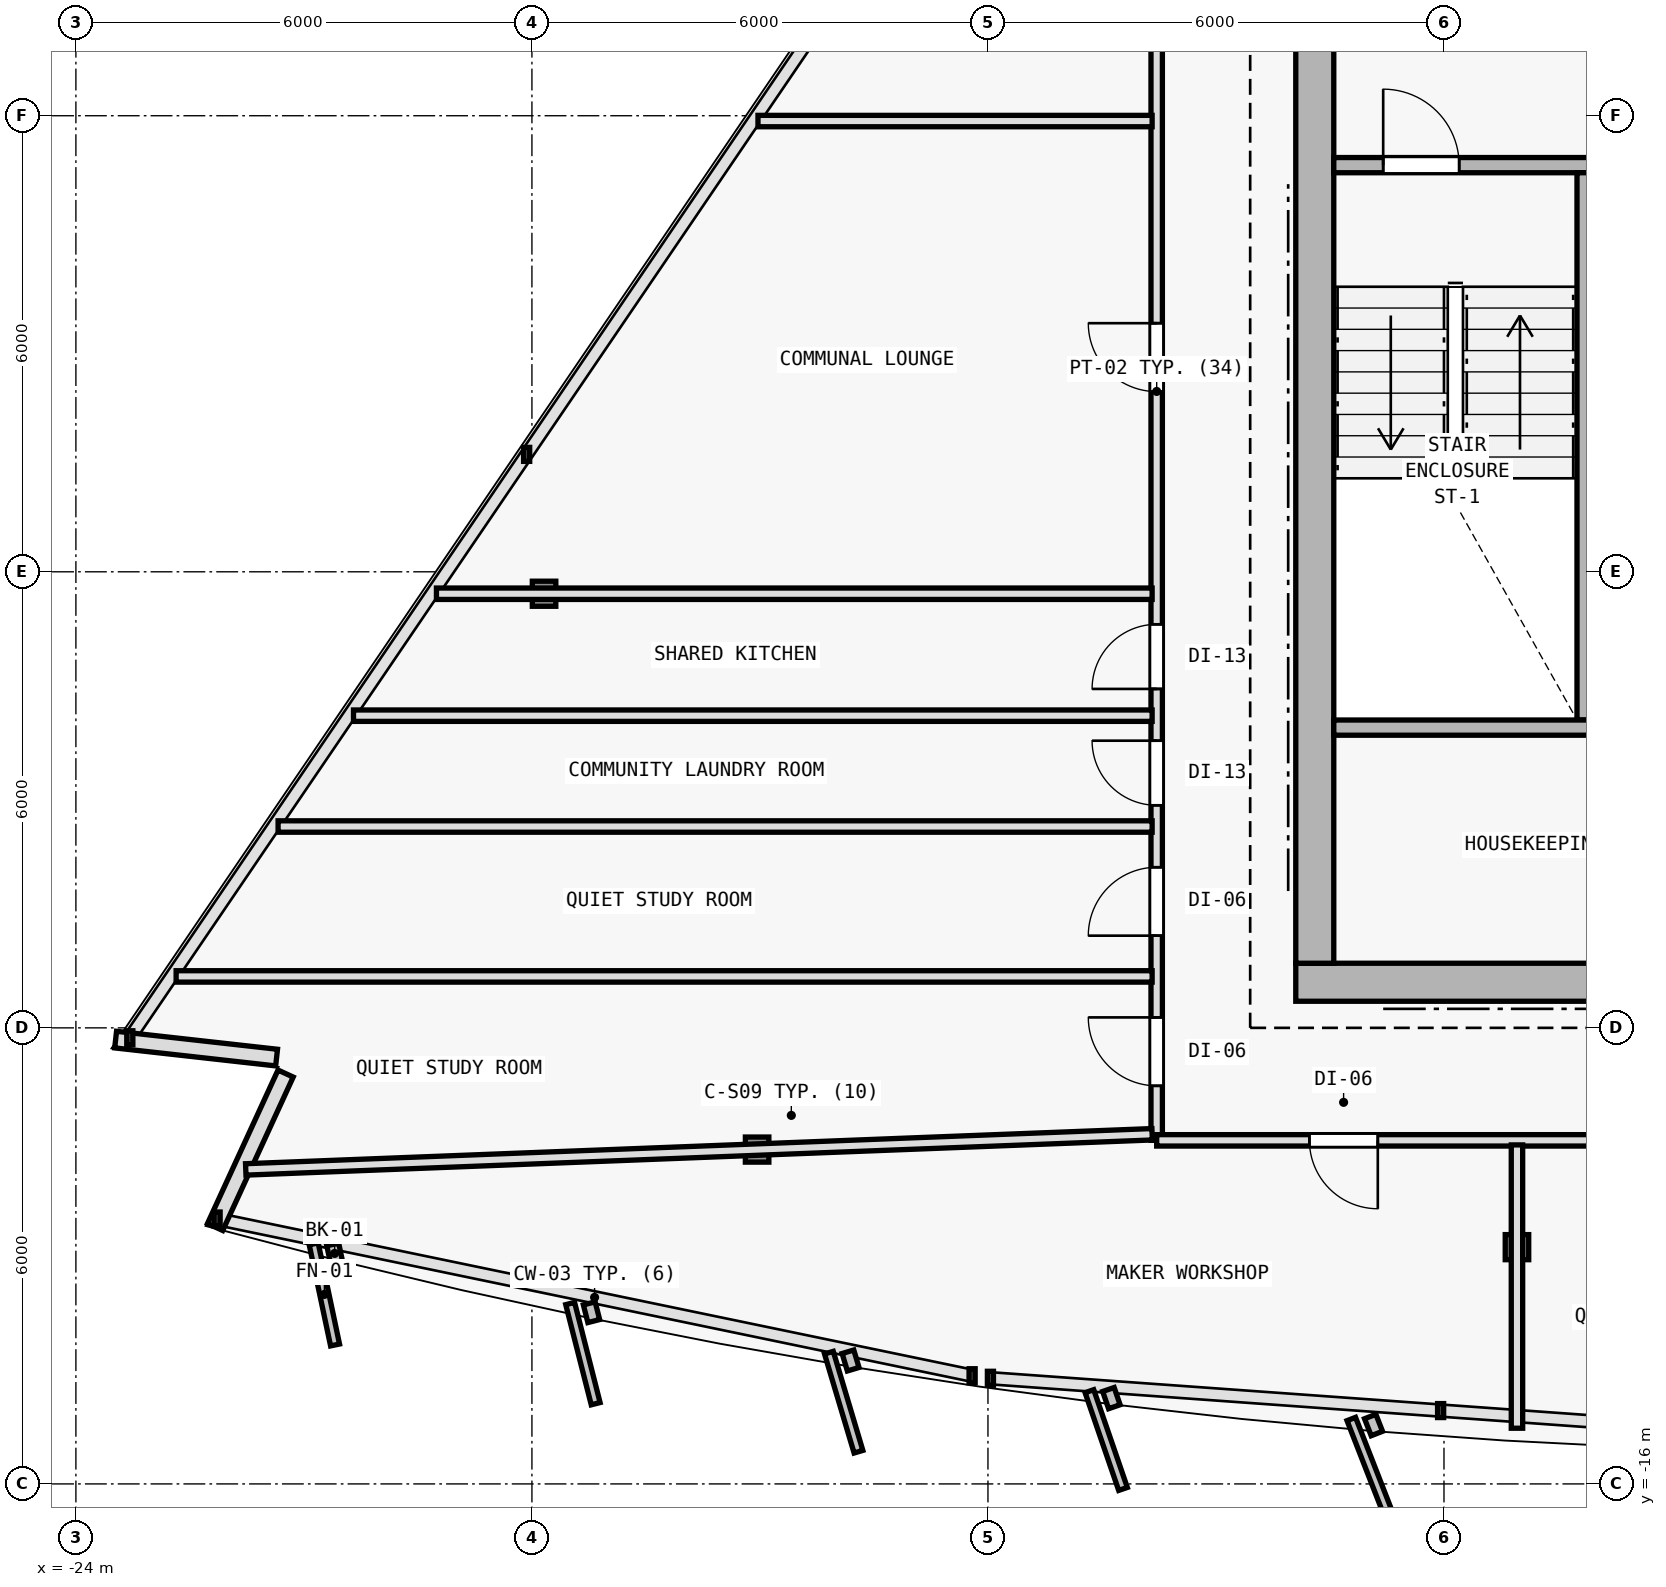
"""IFC4 building model, lengths in metres.
Left out: names, types, materials, properties, quantities, classifications, styles, units other than length and angle.
Written with IfcOpenShell. Run it as: python <this file> out.ifc"""

import sys

from ifc_helpers import new_model, si_unit, direction, frame, frame_2d, origin, origin_2d, place, context, subcontext, project, spatial, rectangle, i_section, extrude, element, fill, save


model = new_model("IFC4")
c1 = context("Model", 3, precision=1e-05, world=origin(), true_north=direction((0.0, 1.0)))
c2 = subcontext(c1, "Body", "Model", "MODEL_VIEW")
j1 = project(units=[si_unit("LENGTHUNIT", "METRE"), si_unit("PLANEANGLEUNIT", "RADIAN")], contexts=[c1])
p1 = place(None, origin())
s1 = spatial("IfcSite", under=j1, at=p1, CompositionType="ELEMENT")
p2 = place(p1, origin())
s2 = spatial("IfcBuilding", under=s1, at=p2, CompositionType="ELEMENT")
p3 = place(p2, frame((0.0, 0.0, 294.0)))
s3 = spatial("IfcBuildingStorey", under=s2, at=p3, CompositionType="ELEMENT", Elevation=294.0)
for number, where, z_axis, x_axis in (
    (1, (-7.7, -9.4, 0.0), (0.0, 0.0, 1.0), (1.0, 0.0, 0.0)),
    (2, (-7.7, 2.0, 0.0), (0.0, 0.0, 1.0), (1.0, 0.0, 0.0)),
):
    element("IfcColumn", number, at=place(p3, frame(where, z_axis=z_axis, x_axis=x_axis)), inside=s3, PredefinedType="COLUMN", context=c2, shape_type="SweptSolid", body=[
        extrude(i_section(OverallWidth=0.374, OverallDepth=0.372, WebThickness=0.012, FlangeThickness=0.02, FilletRadius=0.015, at=origin_2d()), origin(), (0.0, 0.0, 1.0), 3.6),
    ])
for number, where, z_axis, x_axis in (
    (3, (-15.037, -11.602, 0.006), (0.0, 0.0, 1.0), (1.0, 0.0, 0.0)),
    (4, (-5.04, -12.885, 0.006), (0.0, 0.0, 1.0), (1.0, 0.0, 0.0)),
    (5, (-17.84, -4.289, 0.006), (0.0, 0.0, 1.0), (1.0, 0.0, 0.0)),
):
    element("IfcColumn", number, at=place(p3, frame(where, z_axis=z_axis, x_axis=x_axis)), inside=s3, PredefinedType="COLUMN", context=c2, shape_type="SweptSolid", body=[
        extrude(i_section(OverallWidth=0.309, OverallDepth=0.33, WebThickness=0.011, FlangeThickness=0.019, FilletRadius=0.027, at=origin_2d()), origin(), (0.0, 0.0, 1.0), 3.594),
    ])
p4 = place(p3, frame((-21.36, -10.391, 0.0), z_axis=(0.0, 0.0, 1.0), x_axis=(-0.993817888275, 0.111022542511, 0.0)))
e6 = element("IfcWall", 6, at=p4, inside=s3, PredefinedType="SOLIDWALL", context=c2, shape_type="SweptSolid", body=[
    extrude(rectangle(XDim=2.131, YDim=0.22, at=frame_2d((1.065, 0.0))), origin(), (0.0, 0.0, 1.0), 3.34),
])
p5 = place(p3, frame((-22.168, -12.62, 0.0), z_axis=(0.0, 0.0, 1.0), x_axis=(0.417426589535, 0.908710648308, 0.0)))
e7 = element("IfcWall", 7, at=p5, inside=s3, PredefinedType="SOLIDWALL", context=c2, shape_type="SweptSolid", body=[
    extrude(rectangle(XDim=2.221, YDim=0.22, at=frame_2d((1.111, 0.0))), origin(), (0.0, 0.0, 1.0), 3.34),
])
p6 = place(p3, frame((-7.95, -9.4, 0.0), z_axis=(0.0, 0.0, 1.0), x_axis=(1.0, 0.0, 0.0)))
e8 = element("IfcWall", 8, at=p6, inside=s3, PredefinedType="SHEAR", context=c2, shape_type="SweptSolid", body=[
    extrude(rectangle(XDim=15.9, YDim=0.5, at=frame_2d((7.95, 0.0))), origin(), (0.0, 0.0, 1.0), 3.34),
])
p7 = place(p6, frame((9.6, 0.0, 0.0)))
e9 = element("IfcOpeningElement", 9, at=p7, cuts=e8, PredefinedType="OPENING", context=c2, shape_type="SweptSolid", body=[
    extrude(rectangle(XDim=1.5, YDim=2.2, at=frame_2d((0.75, 1.1))), frame((0.0, 0.26, 0.0), z_axis=(0.0, -1.0, 0.0), x_axis=(1.0, 0.0, 0.0)), (0.0, 0.0, 1.0), 0.52),
])
p8 = place(p3, frame((-7.7, -9.15, 0.0), z_axis=(0.0, 0.0, 1.0), x_axis=(0.0, 1.0, 0.0)))
e10 = element("IfcWall", 10, at=p8, inside=s3, PredefinedType="SHEAR", context=c2, shape_type="SweptSolid", body=[
    extrude(rectangle(XDim=19.1, YDim=0.5, at=frame_2d((9.55, 0.0))), origin(), (0.0, 0.0, 1.0), 3.34),
])
p9 = place(p8, frame((12.7, 0.0, 0.0)))
e11 = element("IfcOpeningElement", 11, at=p9, cuts=e10, PredefinedType="OPENING", context=c2, shape_type="SweptSolid", body=[
    extrude(rectangle(XDim=1.1, YDim=2.15, at=frame_2d((0.55, 1.075))), frame((0.0, 0.26, 0.0), z_axis=(0.0, -1.0, 0.0), x_axis=(1.0, 0.0, 0.0)), (0.0, 0.0, 1.0), 0.52),
])
p10 = place(p3, frame((-7.45, 1.35, 0.0), z_axis=(0.0, 0.0, 1.0), x_axis=(1.0, 0.0, 0.0)))
e12 = element("IfcWall", 12, at=p10, inside=s3, PredefinedType="SOLIDWALL", context=c2, shape_type="SweptSolid", body=[
    extrude(rectangle(XDim=3.4, YDim=0.2, at=frame_2d((1.7, 0.0))), origin(), (0.0, 0.0, 1.0), 3.34),
])
p11 = place(p10, frame((0.65, 0.0, 0.0)))
e13 = element("IfcOpeningElement", 13, at=p11, cuts=e12, PredefinedType="OPENING", context=c2, shape_type="SweptSolid", body=[
    extrude(rectangle(XDim=1.0, YDim=2.15, at=frame_2d((0.5, 1.075))), frame((0.0, 0.11, 0.0), z_axis=(0.0, -1.0, 0.0), x_axis=(1.0, 0.0, 0.0)), (0.0, 0.0, 1.0), 0.22),
])
p12 = place(p3, frame((-4.15, -5.95, 0.0), z_axis=(0.0, 0.0, 1.0), x_axis=(0.0, 1.0, 0.0)))
e14 = element("IfcWall", 14, at=p12, inside=s3, PredefinedType="SOLIDWALL", context=c2, shape_type="SweptSolid", body=[
    extrude(rectangle(XDim=7.2, YDim=0.2, at=frame_2d((3.6, 0.0))), origin(), (0.0, 0.0, 1.0), 3.34),
])
p13 = place(p3, frame((-7.45, -6.05, 0.0), z_axis=(0.0, 0.0, 1.0), x_axis=(1.0, 0.0, 0.0)))
e15 = element("IfcWall", 15, at=p13, inside=s3, PredefinedType="SOLIDWALL", context=c2, shape_type="SweptSolid", body=[
    extrude(rectangle(XDim=3.4, YDim=0.2, at=frame_2d((1.7, 0.0))), origin(), (0.0, 0.0, 1.0), 3.34),
])
p14 = place(p3, frame((-9.78, -11.48, 0.0), z_axis=(0.0, 0.0, 1.0), x_axis=(0.0, 1.0, 0.0)))
e16 = element("IfcWall", 16, at=p14, inside=s3, PredefinedType="PARTITIONING", context=c2, shape_type="SweptSolid", body=[
    extrude(rectangle(XDim=19.706, YDim=0.15, at=frame_2d((9.853, 0.0))), origin(), (0.0, 0.0, 1.0), 2.915),
])
p15 = place(p14, frame((9.851, 0.0, 0.0)))
e17 = element("IfcOpeningElement", 17, at=p15, cuts=e16, PredefinedType="OPENING", context=c2, shape_type="SweptSolid", body=[
    extrude(rectangle(XDim=0.9, YDim=2.1, at=frame_2d((0.45, 1.05))), frame((0.0, 0.085, 0.0), z_axis=(0.0, -1.0, 0.0), x_axis=(1.0, 0.0, 0.0)), (0.0, 0.0, 1.0), 0.17),
])
p16 = place(p14, frame((5.939, 0.0, 0.0)))
e18 = element("IfcOpeningElement", 18, at=p16, cuts=e16, PredefinedType="OPENING", context=c2, shape_type="SweptSolid", body=[
    extrude(rectangle(XDim=0.85, YDim=2.1, at=frame_2d((0.425, 1.05))), frame((0.0, 0.085, 0.0), z_axis=(0.0, -1.0, 0.0), x_axis=(1.0, 0.0, 0.0)), (0.0, 0.0, 1.0), 0.17),
])
p17 = place(p14, frame((4.408, 0.0, 0.0)))
e19 = element("IfcOpeningElement", 19, at=p17, cuts=e16, PredefinedType="OPENING", context=c2, shape_type="SweptSolid", body=[
    extrude(rectangle(XDim=0.85, YDim=2.1, at=frame_2d((0.425, 1.05))), frame((0.0, 0.085, 0.0), z_axis=(0.0, -1.0, 0.0), x_axis=(1.0, 0.0, 0.0)), (0.0, 0.0, 1.0), 0.17),
])
p18 = place(p14, frame((2.693, 0.0, 0.0)))
e20 = element("IfcOpeningElement", 20, at=p18, cuts=e16, PredefinedType="OPENING", context=c2, shape_type="SweptSolid", body=[
    extrude(rectangle(XDim=0.9, YDim=2.1, at=frame_2d((0.45, 1.05))), frame((0.0, 0.085, 0.0), z_axis=(0.0, -1.0, 0.0), x_axis=(1.0, 0.0, 0.0)), (0.0, 0.0, 1.0), 0.17),
])
p19 = place(p14, frame((0.718, 0.0, 0.0)))
e21 = element("IfcOpeningElement", 21, at=p19, cuts=e16, PredefinedType="OPENING", context=c2, shape_type="SweptSolid", body=[
    extrude(rectangle(XDim=0.9, YDim=2.1, at=frame_2d((0.45, 1.05))), frame((0.0, 0.085, 0.0), z_axis=(0.0, -1.0, 0.0), x_axis=(1.0, 0.0, 0.0)), (0.0, 0.0, 1.0), 0.17),
])
p20 = place(p14, frame((16.019, 0.0, 0.0)))
e22 = element("IfcOpeningElement", 22, at=p20, cuts=e16, PredefinedType="OPENING", context=c2, shape_type="SweptSolid", body=[
    extrude(rectangle(XDim=0.9, YDim=2.1, at=frame_2d((0.45, 1.05))), frame((0.0, 0.085, 0.0), z_axis=(0.0, -1.0, 0.0), x_axis=(1.0, 0.0, 0.0)), (0.0, 0.0, 1.0), 0.17),
])
p21 = place(p3, frame((9.78, -11.48, 0.0), z_axis=(0.0, 0.0, 1.0), x_axis=(-1.0, 0.0, 0.0)))
e23 = element("IfcWall", 23, at=p21, inside=s3, PredefinedType="PARTITIONING", context=c2, shape_type="SweptSolid", body=[
    extrude(rectangle(XDim=19.56, YDim=0.15, at=frame_2d((9.78, 0.0))), origin(), (0.0, 0.0, 1.0), 2.715),
])
p22 = place(p21, frame((16.651, 0.0, 0.0)))
e24 = element("IfcOpeningElement", 24, at=p22, cuts=e23, PredefinedType="OPENING", context=c2, shape_type="SweptSolid", body=[
    extrude(rectangle(XDim=0.9, YDim=2.1, at=frame_2d((0.45, 1.05))), frame((0.0, 0.085, 0.0), z_axis=(0.0, -1.0, 0.0), x_axis=(1.0, 0.0, 0.0)), (0.0, 0.0, 1.0), 0.17),
])
p23 = place(p21, frame((12.823, 0.0, 0.0)))
e25 = element("IfcOpeningElement", 25, at=p23, cuts=e23, PredefinedType="OPENING", context=c2, shape_type="SweptSolid", body=[
    extrude(rectangle(XDim=0.9, YDim=2.1, at=frame_2d((0.45, 1.05))), frame((0.0, 0.085, 0.0), z_axis=(0.0, -1.0, 0.0), x_axis=(1.0, 0.0, 0.0)), (0.0, 0.0, 1.0), 0.17),
])
p24 = place(p21, frame((10.222, 0.0, 0.0)))
e26 = element("IfcOpeningElement", 26, at=p24, cuts=e23, PredefinedType="OPENING", context=c2, shape_type="SweptSolid", body=[
    extrude(rectangle(XDim=0.9, YDim=2.1, at=frame_2d((0.45, 1.05))), frame((0.0, 0.085, 0.0), z_axis=(0.0, -1.0, 0.0), x_axis=(1.0, 0.0, 0.0)), (0.0, 0.0, 1.0), 0.17),
])
p25 = place(p21, frame((7.867, 0.0, 0.0)))
e27 = element("IfcOpeningElement", 27, at=p25, cuts=e23, PredefinedType="OPENING", context=c2, shape_type="SweptSolid", body=[
    extrude(rectangle(XDim=0.9, YDim=2.1, at=frame_2d((0.45, 1.05))), frame((0.0, 0.085, 0.0), z_axis=(0.0, -1.0, 0.0), x_axis=(1.0, 0.0, 0.0)), (0.0, 0.0, 1.0), 0.17),
])
p26 = place(p21, frame((5.428, 0.0, 0.0)))
e28 = element("IfcOpeningElement", 28, at=p26, cuts=e23, PredefinedType="OPENING", context=c2, shape_type="SweptSolid", body=[
    extrude(rectangle(XDim=0.9, YDim=2.1, at=frame_2d((0.45, 1.05))), frame((0.0, 0.085, 0.0), z_axis=(0.0, -1.0, 0.0), x_axis=(1.0, 0.0, 0.0)), (0.0, 0.0, 1.0), 0.17),
])
p27 = place(p3, frame((-9.84, -11.4, 0.0), z_axis=(0.0, 0.0, 1.0), x_axis=(-0.999249099211, -0.038745809153, 0.0)))
e29 = element("IfcWall", 29, at=p27, inside=s3, PredefinedType="PARTITIONING", context=c2, shape_type="SweptSolid", body=[
    extrude(rectangle(XDim=11.934, YDim=0.15, at=frame_2d((5.967, 0.0))), origin(), (0.0, 0.0, 1.0), 3.005),
])
p28 = place(p3, frame((-5.04, -11.54, 0.0), z_axis=(0.0, 0.0, 1.0), x_axis=(0.0, -1.0, 0.0)))
e30 = element("IfcWall", 30, at=p28, inside=s3, PredefinedType="PARTITIONING", context=c2, shape_type="SweptSolid", body=[
    extrude(rectangle(XDim=3.727, YDim=0.15, at=frame_2d((1.864, 0.0))), origin(), (0.0, 0.0, 1.0), 3.005),
])
p29 = place(p3, frame((-9.84, -4.289, 0.0), z_axis=(0.0, 0.0, 1.0), x_axis=(-1.0, 0.0, 0.0)))
e31 = element("IfcWall", 31, at=p29, inside=s3, PredefinedType="PARTITIONING", context=c2, shape_type="SweptSolid", body=[
    extrude(rectangle(XDim=9.416, YDim=0.15, at=frame_2d((4.708, 0.0))), origin(), (0.0, 0.0, 1.0), 2.915),
])
p30 = place(p3, frame((-9.84, -7.351, 0.0), z_axis=(0.0, 0.0, 1.0), x_axis=(-1.0, 0.0, 0.0)))
e32 = element("IfcWall", 32, at=p30, inside=s3, PredefinedType="PARTITIONING", context=c2, shape_type="SweptSolid", body=[
    extrude(rectangle(XDim=11.5, YDim=0.15, at=frame_2d((5.75, 0.0))), origin(), (0.0, 0.0, 1.0), 2.915),
])
p31 = place(p3, frame((-9.84, -5.893, 0.0), z_axis=(0.0, 0.0, 1.0), x_axis=(-1.0, 0.0, 0.0)))
e33 = element("IfcWall", 33, at=p31, inside=s3, PredefinedType="PARTITIONING", context=c2, shape_type="SweptSolid", body=[
    extrude(rectangle(XDim=10.508, YDim=0.15, at=frame_2d((5.254, 0.0))), origin(), (0.0, 0.0, 1.0), 2.915),
])
p32 = place(p3, frame((-9.84, -9.323, 0.0), z_axis=(0.0, 0.0, 1.0), x_axis=(-1.0, 0.0, 0.0)))
e34 = element("IfcWall", 34, at=p32, inside=s3, PredefinedType="PARTITIONING", context=c2, shape_type="SweptSolid", body=[
    extrude(rectangle(XDim=12.841, YDim=0.15, at=frame_2d((6.421, 0.0))), origin(), (0.0, 0.0, 1.0), 3.005),
])
p33 = place(p3, frame((-9.84, 1.93, 0.0), z_axis=(0.0, 0.0, 1.0), x_axis=(-1.0, 0.0, 0.0)))
e35 = element("IfcWall", 35, at=p33, inside=s3, PredefinedType="PARTITIONING", context=c2, shape_type="SweptSolid", body=[
    extrude(rectangle(XDim=5.186, YDim=0.15, at=frame_2d((2.593, 0.0))), origin(), (0.0, 0.0, 1.0), 3.005),
])
p34 = place(p11, origin())
e36 = element("IfcDoor", 36, at=p34, inside=s3, OperationType="SINGLE_SWING_LEFT", PredefinedType="DOOR", context=c2, shape_type="SweptSolid", body=[
    extrude(rectangle(XDim=1.0, YDim=2.15, at=frame_2d((0.5, 1.075))), frame((0.0, 0.025, 0.0), z_axis=(0.0, -1.0, 0.0), x_axis=(1.0, 0.0, 0.0)), (0.0, 0.0, 1.0), 0.05),
])
fill(e13, e36)
p35 = place(p15, origin())
e37 = element("IfcDoor", 37, at=p35, inside=s3, OperationType="SINGLE_SWING_RIGHT", PredefinedType="DOOR", context=c2, shape_type="SweptSolid", body=[
    extrude(rectangle(XDim=0.9, YDim=2.1, at=frame_2d((0.45, 1.05))), frame((0.0, 0.025, 0.0), z_axis=(0.0, -1.0, 0.0), x_axis=(1.0, 0.0, 0.0)), (0.0, 0.0, 1.0), 0.05),
])
fill(e17, e37)
p36 = place(p16, origin())
e38 = element("IfcDoor", 38, at=p36, inside=s3, OperationType="SINGLE_SWING_LEFT", PredefinedType="DOOR", context=c2, shape_type="SweptSolid", body=[
    extrude(rectangle(XDim=0.85, YDim=2.1, at=frame_2d((0.425, 1.05))), frame((0.0, 0.025, 0.0), z_axis=(0.0, -1.0, 0.0), x_axis=(1.0, 0.0, 0.0)), (0.0, 0.0, 1.0), 0.05),
])
fill(e18, e38)
p37 = place(p17, origin())
e39 = element("IfcDoor", 39, at=p37, inside=s3, OperationType="SINGLE_SWING_RIGHT", PredefinedType="DOOR", context=c2, shape_type="SweptSolid", body=[
    extrude(rectangle(XDim=0.85, YDim=2.1, at=frame_2d((0.425, 1.05))), frame((0.0, 0.025, 0.0), z_axis=(0.0, -1.0, 0.0), x_axis=(1.0, 0.0, 0.0)), (0.0, 0.0, 1.0), 0.05),
])
fill(e19, e39)
p38 = place(p18, origin())
e40 = element("IfcDoor", 40, at=p38, inside=s3, OperationType="SINGLE_SWING_LEFT", PredefinedType="DOOR", context=c2, shape_type="SweptSolid", body=[
    extrude(rectangle(XDim=0.9, YDim=2.1, at=frame_2d((0.45, 1.05))), frame((0.0, 0.025, 0.0), z_axis=(0.0, -1.0, 0.0), x_axis=(1.0, 0.0, 0.0)), (0.0, 0.0, 1.0), 0.05),
])
fill(e20, e40)
p39 = place(p19, origin())
e41 = element("IfcDoor", 41, at=p39, inside=s3, OperationType="SINGLE_SWING_RIGHT", PredefinedType="DOOR", context=c2, shape_type="SweptSolid", body=[
    extrude(rectangle(XDim=0.9, YDim=2.1, at=frame_2d((0.45, 1.05))), frame((0.0, 0.025, 0.0), z_axis=(0.0, -1.0, 0.0), x_axis=(1.0, 0.0, 0.0)), (0.0, 0.0, 1.0), 0.05),
])
fill(e21, e41)
p40 = place(p22, origin())
e42 = element("IfcDoor", 42, at=p40, inside=s3, OperationType="SINGLE_SWING_LEFT", PredefinedType="DOOR", context=c2, shape_type="SweptSolid", body=[
    extrude(rectangle(XDim=0.9, YDim=2.1, at=frame_2d((0.45, 1.05))), frame((0.0, 0.025, 0.0), z_axis=(0.0, -1.0, 0.0), x_axis=(1.0, 0.0, 0.0)), (0.0, 0.0, 1.0), 0.05),
])
fill(e24, e42)
save(model, sys.argv[1])
